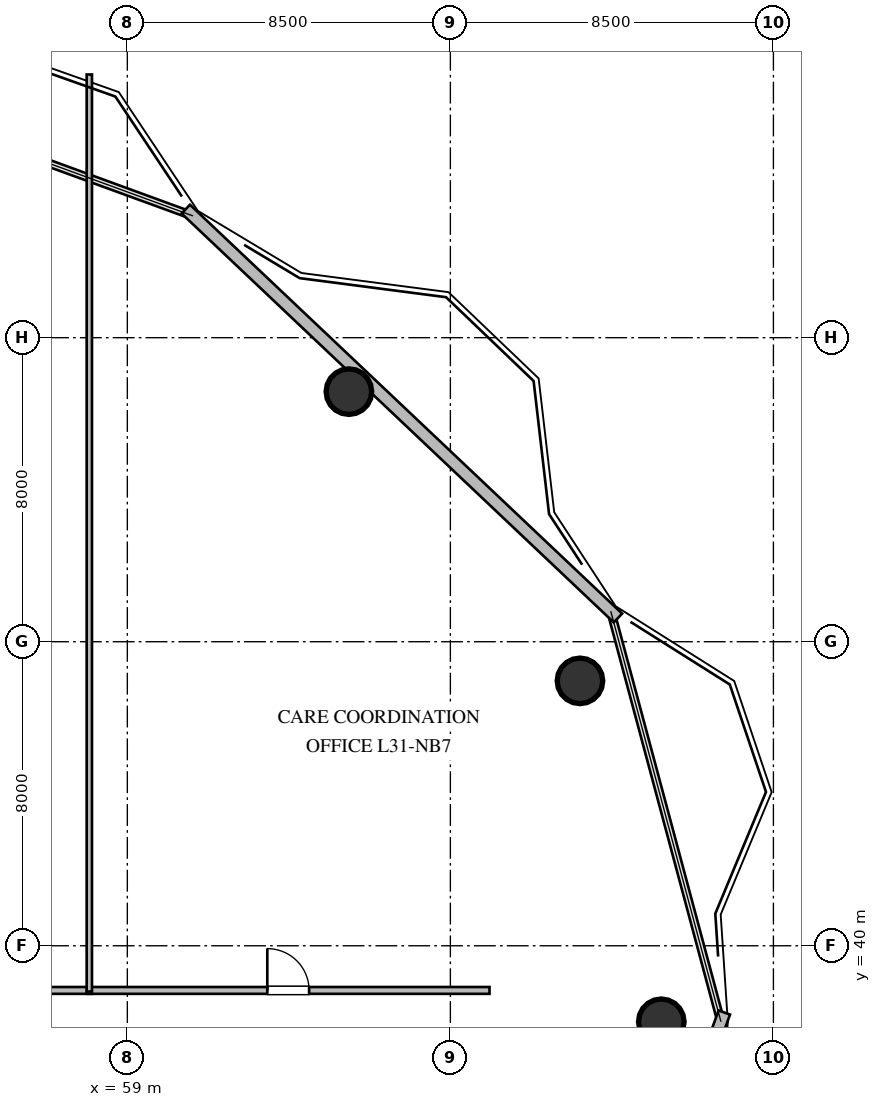
"""IFC4 building model, lengths in metres.
Left out: names, types, materials, properties, quantities, classifications, styles, units other than length and angle.
Written with IfcOpenShell. Run it as: python <this file> out.ifc"""

import sys

from ifc_helpers import new_model, si_unit, direction, frame, frame_2d, origin, origin_2d, place, context, subcontext, project, spatial, rectangle, circle, extrude, element, fill, save


model = new_model("IFC4")
c1 = context("Model", 3, precision=1e-05, world=origin(), true_north=direction((0.0, 1.0)))
c2 = subcontext(c1, "Body", "Model", "MODEL_VIEW")
j1 = project(units=[si_unit("LENGTHUNIT", "METRE"), si_unit("PLANEANGLEUNIT", "RADIAN")], contexts=[c1])
p1 = place(None, origin())
s1 = spatial("IfcSite", under=j1, at=p1, CompositionType="ELEMENT")
p2 = place(p1, origin())
s2 = spatial("IfcBuilding", under=s1, at=p2, CompositionType="ELEMENT")
p3 = place(p2, frame((0.0, 0.0, 120.6)))
s3 = spatial("IfcBuildingStorey", under=s2, at=p3, CompositionType="ELEMENT", Elevation=120.6)
for number, where, z_axis, x_axis in (
    (1, (73.05, 38.0, 0.0), (0.0, 0.0, 1.0), (1.0, 0.0, 0.0)),
    (2, (70.91, 46.97, 0.0), (0.0, 0.0, 1.0), (1.0, 0.0, 0.0)),
    (3, (64.83, 54.58, 0.0), (0.0, 0.0, 1.0), (1.0, 0.0, 0.0)),
):
    element("IfcColumn", number, at=place(p3, frame(where, z_axis=z_axis, x_axis=x_axis)), inside=s3, PredefinedType="COLUMN", context=c2, shape_type="SweptSolid", body=[
        extrude(circle(Radius=0.6, at=origin_2d()), origin(), (0.0, 0.0, 1.0), 3.6),
    ])
p4 = place(p3, frame((74.708, 38.244, 0.0), z_axis=(0.0, 0.0, 1.0), x_axis=(-0.340324669139, -0.94030799187, 0.0)))
e4 = element("IfcWall", 4, at=p4, inside=s3, PredefinedType="STANDARD", context=c2, shape_type="SweptSolid", body=[
    extrude(rectangle(XDim=13.81, YDim=0.32, at=frame_2d((6.905, 0.0))), origin(), (0.0, 0.0, 1.0), 3.36),
])
p5 = place(p3, frame((60.538, 59.383, 0.0), z_axis=(0.0, 0.0, 1.0), x_axis=(0.726378346584, -0.687295058628, 0.0)))
e5 = element("IfcWall", 5, at=p5, inside=s3, PredefinedType="STANDARD", context=c2, shape_type="SweptSolid", body=[
    extrude(rectangle(XDim=15.654, YDim=0.32, at=frame_2d((7.827, 0.0))), origin(), (0.0, 0.0, 1.0), 3.36),
])
p6 = place(p3, frame((53.435, 38.825, 0.0), z_axis=(0.0, 0.0, 1.0), x_axis=(1.0, 0.0, 0.0)))
e6 = element("IfcWall", 6, at=p6, inside=s3, PredefinedType="PARTITIONING", context=c2, shape_type="SweptSolid", body=[
    extrude(rectangle(XDim=4.63, YDim=0.18, at=frame_2d((2.315, 0.0))), origin(), (0.0, 0.0, 1.0), 3.36),
])
p7 = place(p6, frame((1.765, 0.0, 0.0)))
e7 = element("IfcOpeningElement", 7, at=p7, cuts=e6, PredefinedType="OPENING", context=c2, shape_type="SweptSolid", body=[
    extrude(rectangle(XDim=1.1, YDim=2.1, at=frame_2d((0.55, 1.05))), frame((0.0, 0.1, 0.0), z_axis=(0.0, -1.0, 0.0), x_axis=(1.0, 0.0, 0.0)), (0.0, 0.0, 1.0), 0.2),
])
p8 = place(p3, frame((57.935, 38.825, 0.0), z_axis=(0.0, 0.0, 1.0), x_axis=(1.0, 0.0, 0.0)))
e8 = element("IfcWall", 8, at=p8, inside=s3, PredefinedType="PARTITIONING", context=c2, shape_type="SweptSolid", body=[
    extrude(rectangle(XDim=10.595, YDim=0.18, at=frame_2d((5.297, 0.0))), origin(), (0.0, 0.0, 1.0), 3.36),
])
p9 = place(p8, frame((4.748, 0.0, 0.0)))
e9 = element("IfcOpeningElement", 9, at=p9, cuts=e8, PredefinedType="OPENING", context=c2, shape_type="SweptSolid", body=[
    extrude(rectangle(XDim=1.1, YDim=2.1, at=frame_2d((0.55, 1.05))), frame((0.0, 0.1, 0.0), z_axis=(0.0, -1.0, 0.0), x_axis=(1.0, 0.0, 0.0)), (0.0, 0.0, 1.0), 0.2),
])
p10 = place(p3, frame((58.0, 62.925, 0.0), z_axis=(0.0, 0.0, 1.0), x_axis=(0.0, -1.0, 0.0)))
e10 = element("IfcWall", 10, at=p10, inside=s3, PredefinedType="PARTITIONING", context=c2, shape_type="SweptSolid", body=[
    extrude(rectangle(XDim=24.13, YDim=0.14, at=frame_2d((12.065, 0.0))), origin(), (0.0, 0.0, 1.0), 3.36),
])
p11 = place(p9, origin())
e11 = element("IfcDoor", 11, at=p11, inside=s3, OperationType="SINGLE_SWING_LEFT", PredefinedType="DOOR", context=c2, shape_type="SweptSolid", body=[
    extrude(rectangle(XDim=1.1, YDim=2.1, at=frame_2d((0.55, 1.05))), frame((0.0, 0.025, 0.0), z_axis=(0.0, -1.0, 0.0), x_axis=(1.0, 0.0, 0.0)), (0.0, 0.0, 1.0), 0.05),
])
fill(e9, e11)
save(model, sys.argv[1])
